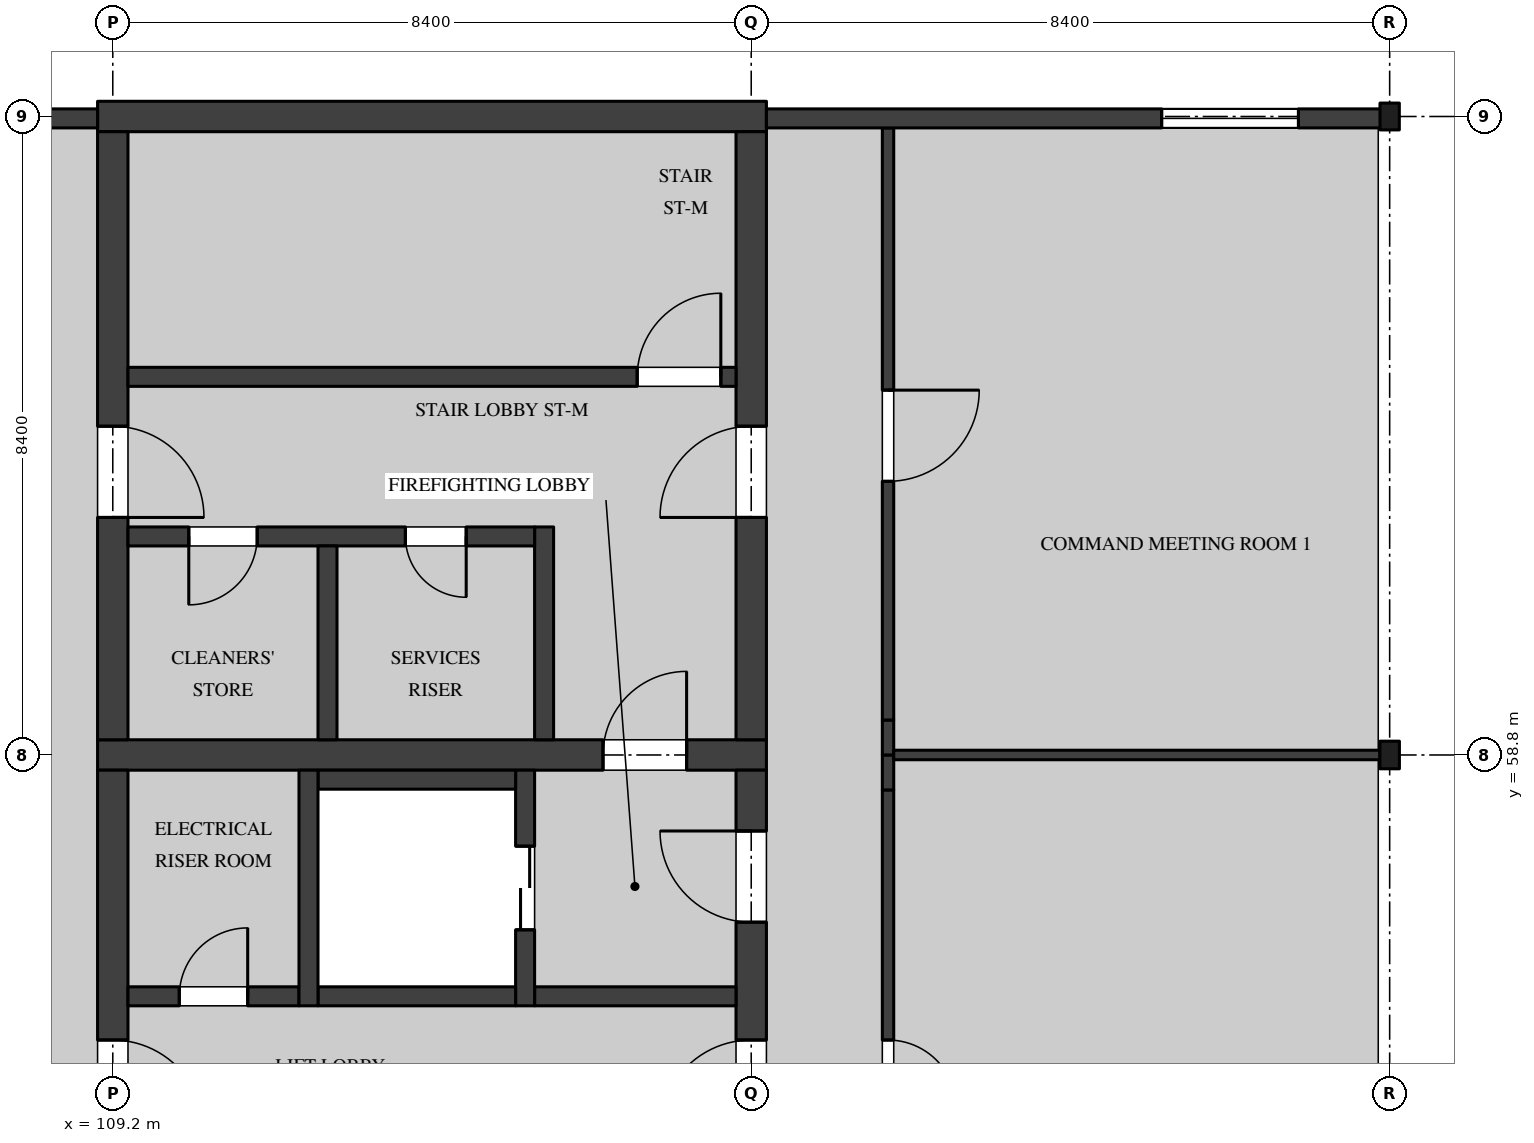
"""IFC4 building model, lengths in metres.
Left out: names, types, materials, properties, quantities, classifications, styles, units other than length and angle.
Written with IfcOpenShell. Run it as: python <this file> out.ifc"""

import sys

from ifc_helpers import new_model, si_unit, direction, frame, frame_2d, origin, origin_2d, place, context, subcontext, project, spatial, rectangle, i_section, extrude, element, fill, save


model = new_model("IFC4")
c1 = context("Model", 3, precision=1e-05, world=origin(), true_north=direction((0.0, 1.0)))
c2 = subcontext(c1, "Body", "Model", "MODEL_VIEW")
j1 = project(units=[si_unit("LENGTHUNIT", "METRE"), si_unit("PLANEANGLEUNIT", "RADIAN")], contexts=[c1])
p1 = place(None, origin())
s1 = spatial("IfcSite", under=j1, at=p1, CompositionType="ELEMENT")
p2 = place(p1, origin())
s2 = spatial("IfcBuilding", under=s1, at=p2, CompositionType="ELEMENT")
p3 = place(p2, frame((0.0, 0.0, 36.9)))
s3 = spatial("IfcBuildingStorey", under=s2, at=p3, CompositionType="ELEMENT", Elevation=36.9)
p4 = place(p3, frame((126.0, 58.8, 0.0), z_axis=(0.0, 0.0, 1.0), x_axis=(1.0, 0.0, 0.0)))
e1 = element("IfcColumn", 1, at=p4, inside=s3, PredefinedType="COLUMN", context=c2, shape_type="SweptSolid", body=[
    extrude(i_section(OverallWidth=0.257, OverallDepth=0.363, WebThickness=0.013, FlangeThickness=0.022, FilletRadius=0.015, at=origin_2d()), origin(), (0.0, 0.0, 1.0), 4.37),
])
p5 = place(p3, frame((126.0, 67.2, 0.0), z_axis=(0.0, 0.0, 1.0), x_axis=(1.0, 0.0, 0.0)))
e2 = element("IfcColumn", 2, at=p5, inside=s3, PredefinedType="COLUMN", context=c2, shape_type="SweptSolid", body=[
    extrude(i_section(OverallWidth=0.254, OverallDepth=0.353, WebThickness=0.01, FlangeThickness=0.016, FilletRadius=0.015, at=origin_2d()), origin(), (0.0, 0.0, 1.0), 4.37),
])
p6 = place(p3, frame((109.0, 58.8, 0.0), z_axis=(0.0, 0.0, 1.0), x_axis=(1.0, 0.0, 0.0)))
e3 = element("IfcWall", 3, at=p6, inside=s3, PredefinedType="SHEAR", context=c2, shape_type="SweptSolid", body=[
    extrude(rectangle(XDim=8.8, YDim=0.4, at=frame_2d((4.4, 0.0))), origin(), (0.0, 0.0, 1.0), 4.37),
])
p7 = place(p6, frame((6.65, 0.0, 0.0)))
e4 = element("IfcOpeningElement", 4, at=p7, cuts=e3, PredefinedType="OPENING", context=c2, shape_type="SweptSolid", body=[
    extrude(rectangle(XDim=1.1, YDim=2.1, at=frame_2d((0.55, 1.05))), frame((0.0, 0.21, 0.0), z_axis=(0.0, -1.0, 0.0), x_axis=(1.0, 0.0, 0.0)), (0.0, 0.0, 1.0), 0.42),
])
p8 = place(p3, frame((109.2, 50.6, 0.0), z_axis=(0.0, 0.0, 1.0), x_axis=(0.0, 1.0, 0.0)))
e5 = element("IfcWall", 5, at=p8, inside=s3, PredefinedType="SHEAR", context=c2, shape_type="SweptSolid", body=[
    extrude(rectangle(XDim=8.0, YDim=0.4, at=frame_2d((4.0, 0.0))), origin(), (0.0, 0.0, 1.0), 4.37),
])
p9 = place(p8, frame((3.25, 0.0, 0.0)))
e6 = element("IfcOpeningElement", 6, at=p9, cuts=e5, PredefinedType="OPENING", context=c2, shape_type="SweptSolid", body=[
    extrude(rectangle(XDim=1.2, YDim=2.1, at=frame_2d((0.6, 1.05))), frame((0.0, 0.21, 0.0), z_axis=(0.0, -1.0, 0.0), x_axis=(1.0, 0.0, 0.0)), (0.0, 0.0, 1.0), 0.42),
])
p10 = place(p3, frame((117.6, 50.6, 0.0), z_axis=(0.0, 0.0, 1.0), x_axis=(0.0, 1.0, 0.0)))
e7 = element("IfcWall", 7, at=p10, inside=s3, PredefinedType="SHEAR", context=c2, shape_type="SweptSolid", body=[
    extrude(rectangle(XDim=8.0, YDim=0.4, at=frame_2d((4.0, 0.0))), origin(), (0.0, 0.0, 1.0), 4.37),
])
p11 = place(p10, frame((3.25, 0.0, 0.0)))
e8 = element("IfcOpeningElement", 8, at=p11, cuts=e7, PredefinedType="OPENING", context=c2, shape_type="SweptSolid", body=[
    extrude(rectangle(XDim=1.2, YDim=2.1, at=frame_2d((0.6, 1.05))), frame((0.0, 0.21, 0.0), z_axis=(0.0, -1.0, 0.0), x_axis=(1.0, 0.0, 0.0)), (0.0, 0.0, 1.0), 0.42),
])
p12 = place(p10, frame((6.0, 0.0, 0.0)))
e9 = element("IfcOpeningElement", 9, at=p12, cuts=e7, PredefinedType="OPENING", context=c2, shape_type="SweptSolid", body=[
    extrude(rectangle(XDim=1.2, YDim=2.1, at=frame_2d((0.6, 1.05))), frame((0.0, 0.21, 0.0), z_axis=(0.0, -1.0, 0.0), x_axis=(1.0, 0.0, 0.0)), (0.0, 0.0, 1.0), 0.42),
])
p13 = place(p3, frame((109.4, 55.625, 0.0), z_axis=(0.0, 0.0, 1.0), x_axis=(1.0, 0.0, 0.0)))
e10 = element("IfcWall", 10, at=p13, inside=s3, PredefinedType="SOLIDWALL", context=c2, shape_type="SweptSolid", body=[
    extrude(rectangle(XDim=2.25, YDim=0.25, at=frame_2d((1.125, 0.0))), origin(), (0.0, 0.0, 1.0), 4.37),
])
p14 = place(p13, frame((0.675, 0.0, 0.0)))
e11 = element("IfcOpeningElement", 11, at=p14, cuts=e10, PredefinedType="OPENING", context=c2, shape_type="SweptSolid", body=[
    extrude(rectangle(XDim=0.9, YDim=2.1, at=frame_2d((0.45, 1.05))), frame((0.0, 0.135, 0.0), z_axis=(0.0, -1.0, 0.0), x_axis=(1.0, 0.0, 0.0)), (0.0, 0.0, 1.0), 0.27),
])
p15 = place(p3, frame((114.75, 55.625, 0.0), z_axis=(0.0, 0.0, 1.0), x_axis=(1.0, 0.0, 0.0)))
e12 = element("IfcWall", 12, at=p15, inside=s3, PredefinedType="SOLIDWALL", context=c2, shape_type="SweptSolid", body=[
    extrude(rectangle(XDim=2.65, YDim=0.25, at=frame_2d((1.325, 0.0))), origin(), (0.0, 0.0, 1.0), 4.37),
])
p16 = place(p3, frame((109.0, 67.2, 0.0), z_axis=(0.0, 0.0, 1.0), x_axis=(1.0, 0.0, 0.0)))
e13 = element("IfcWall", 13, at=p16, inside=s3, PredefinedType="SHEAR", context=c2, shape_type="SweptSolid", body=[
    extrude(rectangle(XDim=8.8, YDim=0.4, at=frame_2d((4.4, 0.0))), origin(), (0.0, 0.0, 1.0), 4.37),
])
p17 = place(p3, frame((109.2, 59.0, 0.0), z_axis=(0.0, 0.0, 1.0), x_axis=(0.0, 1.0, 0.0)))
e14 = element("IfcWall", 14, at=p17, inside=s3, PredefinedType="SHEAR", context=c2, shape_type="SweptSolid", body=[
    extrude(rectangle(XDim=8.0, YDim=0.4, at=frame_2d((4.0, 0.0))), origin(), (0.0, 0.0, 1.0), 4.37),
])
p18 = place(p17, frame((2.925, 0.0, 0.0)))
e15 = element("IfcOpeningElement", 15, at=p18, cuts=e14, PredefinedType="OPENING", context=c2, shape_type="SweptSolid", body=[
    extrude(rectangle(XDim=1.2, YDim=2.1, at=frame_2d((0.6, 1.05))), frame((0.0, 0.21, 0.0), z_axis=(0.0, -1.0, 0.0), x_axis=(1.0, 0.0, 0.0)), (0.0, 0.0, 1.0), 0.42),
])
p19 = place(p3, frame((117.6, 59.0, 0.0), z_axis=(0.0, 0.0, 1.0), x_axis=(0.0, 1.0, 0.0)))
e16 = element("IfcWall", 16, at=p19, inside=s3, PredefinedType="SHEAR", context=c2, shape_type="SweptSolid", body=[
    extrude(rectangle(XDim=8.0, YDim=0.4, at=frame_2d((4.0, 0.0))), origin(), (0.0, 0.0, 1.0), 4.37),
])
p20 = place(p19, frame((2.925, 0.0, 0.0)))
e17 = element("IfcOpeningElement", 17, at=p20, cuts=e16, PredefinedType="OPENING", context=c2, shape_type="SweptSolid", body=[
    extrude(rectangle(XDim=1.2, YDim=2.1, at=frame_2d((0.6, 1.05))), frame((0.0, 0.21, 0.0), z_axis=(0.0, -1.0, 0.0), x_axis=(1.0, 0.0, 0.0)), (0.0, 0.0, 1.0), 0.42),
])
p21 = place(p3, frame((117.4, 63.775, 0.0), z_axis=(0.0, 0.0, 1.0), x_axis=(-1.0, 0.0, 0.0)))
e18 = element("IfcWall", 18, at=p21, inside=s3, PredefinedType="SOLIDWALL", context=c2, shape_type="SweptSolid", body=[
    extrude(rectangle(XDim=8.0, YDim=0.25, at=frame_2d((4.0, 0.0))), origin(), (0.0, 0.0, 1.0), 4.37),
])
p22 = place(p21, frame((0.2, 0.0, 0.0)))
e19 = element("IfcOpeningElement", 19, at=p22, cuts=e18, PredefinedType="OPENING", context=c2, shape_type="SweptSolid", body=[
    extrude(rectangle(XDim=1.1, YDim=2.1, at=frame_2d((0.55, 1.05))), frame((0.0, 0.135, 0.0), z_axis=(0.0, -1.0, 0.0), x_axis=(1.0, 0.0, 0.0)), (0.0, 0.0, 1.0), 0.27),
])
p23 = place(p3, frame((114.875, 61.8, 0.0), z_axis=(0.0, 0.0, 1.0), x_axis=(0.0, -1.0, 0.0)))
e20 = element("IfcWall", 20, at=p23, inside=s3, PredefinedType="SOLIDWALL", context=c2, shape_type="SweptSolid", body=[
    extrude(rectangle(XDim=2.8, YDim=0.25, at=frame_2d((1.4, 0.0))), origin(), (0.0, 0.0, 1.0), 4.37),
])
p24 = place(p3, frame((114.75, 61.675, 0.0), z_axis=(0.0, 0.0, 1.0), x_axis=(-1.0, 0.0, 0.0)))
e21 = element("IfcWall", 21, at=p24, inside=s3, PredefinedType="SOLIDWALL", context=c2, shape_type="SweptSolid", body=[
    extrude(rectangle(XDim=5.35, YDim=0.25, at=frame_2d((2.675, 0.0))), origin(), (0.0, 0.0, 1.0), 4.37),
])
p25 = place(p24, frame((3.65, 0.0, 0.0)))
e22 = element("IfcOpeningElement", 22, at=p25, cuts=e21, PredefinedType="OPENING", context=c2, shape_type="SweptSolid", body=[
    extrude(rectangle(XDim=0.9, YDim=2.1, at=frame_2d((0.45, 1.05))), frame((0.0, 0.135, 0.0), z_axis=(0.0, -1.0, 0.0), x_axis=(1.0, 0.0, 0.0)), (0.0, 0.0, 1.0), 0.27),
])
p26 = place(p24, frame((0.9, 0.0, 0.0)))
e23 = element("IfcOpeningElement", 23, at=p26, cuts=e21, PredefinedType="OPENING", context=c2, shape_type="SweptSolid", body=[
    extrude(rectangle(XDim=0.8, YDim=2.1, at=frame_2d((0.4, 1.05))), frame((0.0, 0.135, 0.0), z_axis=(0.0, -1.0, 0.0), x_axis=(1.0, 0.0, 0.0)), (0.0, 0.0, 1.0), 0.27),
])
p27 = place(p3, frame((112.025, 61.55, 0.0), z_axis=(0.0, 0.0, 1.0), x_axis=(0.0, -1.0, 0.0)))
e24 = element("IfcWall", 24, at=p27, inside=s3, PredefinedType="SOLIDWALL", context=c2, shape_type="SweptSolid", body=[
    extrude(rectangle(XDim=2.55, YDim=0.25, at=frame_2d((1.275, 0.0))), origin(), (0.0, 0.0, 1.0), 4.37),
])
p28 = place(p3, frame((114.625, 55.5, 0.0), z_axis=(0.0, 0.0, 1.0), x_axis=(0.0, 1.0, 0.0)))
e25 = element("IfcWall", 25, at=p28, inside=s3, PredefinedType="SOLIDWALL", context=c2, shape_type="SweptSolid", body=[
    extrude(rectangle(XDim=3.1, YDim=0.25, at=frame_2d((1.55, 0.0))), origin(), (0.0, 0.0, 1.0), 4.37),
])
p29 = place(p28, frame((1.0, 0.0, 0.0)))
e26 = element("IfcOpeningElement", 26, at=p29, cuts=e25, PredefinedType="OPENING", context=c2, shape_type="SweptSolid", body=[
    extrude(rectangle(XDim=1.1, YDim=2.1, at=frame_2d((0.55, 1.05))), frame((0.0, 0.135, 0.0), z_axis=(0.0, -1.0, 0.0), x_axis=(1.0, 0.0, 0.0)), (0.0, 0.0, 1.0), 0.27),
])
for number, where, z_axis, x_axis in (
    (27, (111.9, 58.475, 0.0), (0.0, 0.0, 1.0), (1.0, 0.0, 0.0)),
    (28, (111.9, 55.625, 0.0), (0.0, 0.0, 1.0), (1.0, 0.0, 0.0)),
):
    element("IfcWall", number, at=place(p3, frame(where, z_axis=z_axis, x_axis=x_axis)), inside=s3, PredefinedType="SOLIDWALL", context=c2, shape_type="SweptSolid", body=[
        extrude(rectangle(XDim=2.6, YDim=0.25, at=frame_2d((1.3, 0.0))), origin(), (0.0, 0.0, 1.0), 4.37),
    ])
p30 = place(p3, frame((111.775, 55.5, 0.0), z_axis=(0.0, 0.0, 1.0), x_axis=(0.0, 1.0, 0.0)))
e29 = element("IfcWall", 29, at=p30, inside=s3, PredefinedType="SOLIDWALL", context=c2, shape_type="SweptSolid", body=[
    extrude(rectangle(XDim=3.1, YDim=0.25, at=frame_2d((1.55, 0.0))), origin(), (0.0, 0.0, 1.0), 4.37),
])
p31 = place(p3, frame((119.4, 50.86, 0.0), z_axis=(0.0, 0.0, 1.0), x_axis=(0.0, 1.0, 0.0)))
e30 = element("IfcWall", 30, at=p31, inside=s3, PredefinedType="PARTITIONING", context=c2, shape_type="SweptSolid", body=[
    extrude(rectangle(XDim=7.48, YDim=0.15, at=frame_2d((3.74, 0.0))), origin(), (0.0, 0.0, 1.0), 4.37),
])
p32 = place(p31, frame((3.29, 0.0, 0.0)))
e31 = element("IfcOpeningElement", 31, at=p32, cuts=e30, PredefinedType="OPENING", context=c2, shape_type="SweptSolid", body=[
    extrude(rectangle(XDim=0.9, YDim=2.1, at=frame_2d((0.45, 1.05))), frame((0.0, 0.085, 0.0), z_axis=(0.0, -1.0, 0.0), x_axis=(1.0, 0.0, 0.0)), (0.0, 0.0, 1.0), 0.17),
])
for number, where, z_axis, x_axis in (
    (32, (119.4, 58.34, 0.0), (0.0, 0.0, 1.0), (0.0, 1.0, 0.0)),
    (33, (119.4, 58.8, 0.0), (0.0, 0.0, 1.0), (0.0, 1.0, 0.0)),
):
    element("IfcWall", number, at=place(p3, frame(where, z_axis=z_axis, x_axis=x_axis)), inside=s3, PredefinedType="PARTITIONING", context=c2, shape_type="SweptSolid", body=[
        extrude(rectangle(XDim=0.46, YDim=0.15, at=frame_2d((0.23, 0.0))), origin(), (0.0, 0.0, 1.0), 3.817),
    ])
p33 = place(p3, frame((119.4, 59.26, 0.0), z_axis=(0.0, 0.0, 1.0), x_axis=(0.0, 1.0, 0.0)))
e34 = element("IfcWall", 34, at=p33, inside=s3, PredefinedType="PARTITIONING", context=c2, shape_type="SweptSolid", body=[
    extrude(rectangle(XDim=7.79, YDim=0.15, at=frame_2d((3.895, 0.0))), origin(), (0.0, 0.0, 1.0), 4.37),
])
p34 = place(p33, frame((3.14, 0.0, 0.0)))
e35 = element("IfcOpeningElement", 35, at=p34, cuts=e34, PredefinedType="OPENING", context=c2, shape_type="SweptSolid", body=[
    extrude(rectangle(XDim=1.2, YDim=2.4, at=frame_2d((0.6, 1.2))), frame((0.0, 0.085, 0.0), z_axis=(0.0, -1.0, 0.0), x_axis=(1.0, 0.0, 0.0)), (0.0, 0.0, 1.0), 0.17),
])
p35 = place(p3, frame((119.475, 58.8, 0.0), z_axis=(0.0, 0.0, 1.0), x_axis=(1.0, 0.0, 0.0)))
e36 = element("IfcWall", 36, at=p35, inside=s3, PredefinedType="PARTITIONING", context=c2, shape_type="SweptSolid", body=[
    extrude(rectangle(XDim=6.396, YDim=0.125, at=frame_2d((3.198, 0.0))), origin(), (0.0, 0.0, 1.0), 3.817),
])
p36 = place(p3, frame((125.995, 67.175, 0.0), z_axis=(0.0, 0.0, 1.0), x_axis=(-1.0, 0.0, 0.0)))
e37 = element("IfcWall", 37, at=p36, inside=s3, PredefinedType="SOLIDWALL", context=c2, shape_type="SweptSolid", body=[
    extrude(rectangle(XDim=8.195, YDim=0.25, at=frame_2d((4.097, 0.0))), origin(), (0.0, 0.0, 1.0), 3.819),
])
p37 = place(p36, frame((1.195, 0.0, 0.6)))
e38 = element("IfcOpeningElement", 38, at=p37, cuts=e37, PredefinedType="OPENING", context=c2, shape_type="SweptSolid", body=[
    extrude(rectangle(XDim=1.8, YDim=2.7, at=frame_2d((0.9, 1.35))), frame((0.0, 0.135, 0.0), z_axis=(0.0, -1.0, 0.0), x_axis=(1.0, 0.0, 0.0)), (0.0, 0.0, 1.0), 0.27),
])
p38 = place(p3, frame((109.0, 67.175, 0.0), z_axis=(0.0, 0.0, 1.0), x_axis=(-1.0, 0.0, 0.0)))
e39 = element("IfcWall", 39, at=p38, inside=s3, PredefinedType="SOLIDWALL", context=c2, shape_type="SweptSolid", body=[
    extrude(rectangle(XDim=8.195, YDim=0.25, at=frame_2d((4.097, 0.0))), origin(), (0.0, 0.0, 1.0), 3.819),
])
p39 = place(p38, frame((5.65, 0.0, 1.5)))
e40 = element("IfcOpeningElement", 40, at=p39, cuts=e39, PredefinedType="OPENING", context=c2, shape_type="SweptSolid", body=[
    extrude(rectangle(XDim=0.9, YDim=1.2, at=frame_2d((0.45, 0.6))), frame((0.0, 0.135, 0.0), z_axis=(0.0, -1.0, 0.0), x_axis=(1.0, 0.0, 0.0)), (0.0, 0.0, 1.0), 0.27),
])
p40 = place(p9, frame((1.2, 0.0, 0.0), z_axis=(0.0, 0.0, 1.0), x_axis=(-1.0, 0.0, 0.0)))
e41 = element("IfcDoor", 41, at=p40, inside=s3, OperationType="SINGLE_SWING_LEFT", PredefinedType="DOOR", context=c2, shape_type="SweptSolid", body=[
    extrude(rectangle(XDim=1.2, YDim=2.1, at=frame_2d((0.6, 1.05))), frame((0.0, 0.035, 0.0), z_axis=(0.0, -1.0, 0.0), x_axis=(1.0, 0.0, 0.0)), (0.0, 0.0, 1.0), 0.07),
])
fill(e6, e41)
p41 = place(p11, origin())
e42 = element("IfcDoor", 42, at=p41, inside=s3, OperationType="SINGLE_SWING_RIGHT", PredefinedType="DOOR", context=c2, shape_type="SweptSolid", body=[
    extrude(rectangle(XDim=1.2, YDim=2.1, at=frame_2d((0.6, 1.05))), frame((0.0, 0.035, 0.0), z_axis=(0.0, -1.0, 0.0), x_axis=(1.0, 0.0, 0.0)), (0.0, 0.0, 1.0), 0.07),
])
fill(e8, e42)
p42 = place(p12, origin())
e43 = element("IfcDoor", 43, at=p42, inside=s3, OperationType="SINGLE_SWING_LEFT", PredefinedType="DOOR", context=c2, shape_type="SweptSolid", body=[
    extrude(rectangle(XDim=1.2, YDim=2.1, at=frame_2d((0.6, 1.05))), frame((0.0, 0.035, 0.0), z_axis=(0.0, -1.0, 0.0), x_axis=(1.0, 0.0, 0.0)), (0.0, 0.0, 1.0), 0.07),
])
fill(e9, e43)
p43 = place(p7, origin())
e44 = element("IfcDoor", 44, at=p43, inside=s3, OperationType="SINGLE_SWING_LEFT", PredefinedType="DOOR", context=c2, shape_type="SweptSolid", body=[
    extrude(rectangle(XDim=1.1, YDim=2.1, at=frame_2d((0.55, 1.05))), frame((0.0, 0.035, 0.0), z_axis=(0.0, -1.0, 0.0), x_axis=(1.0, 0.0, 0.0)), (0.0, 0.0, 1.0), 0.07),
])
fill(e4, e44)
p44 = place(p14, origin())
e45 = element("IfcDoor", 45, at=p44, inside=s3, OperationType="SINGLE_SWING_LEFT", PredefinedType="DOOR", context=c2, shape_type="SweptSolid", body=[
    extrude(rectangle(XDim=0.9, YDim=2.1, at=frame_2d((0.45, 1.05))), frame((0.0, 0.05, 0.0), z_axis=(0.0, -1.0, 0.0), x_axis=(1.0, 0.0, 0.0)), (0.0, 0.0, 1.0), 0.1),
])
fill(e11, e45)
p45 = place(p25, origin())
e46 = element("IfcDoor", 46, at=p45, inside=s3, OperationType="SINGLE_SWING_LEFT", PredefinedType="DOOR", context=c2, shape_type="SweptSolid", body=[
    extrude(rectangle(XDim=0.9, YDim=2.1, at=frame_2d((0.45, 1.05))), frame((0.0, 0.035, 0.0), z_axis=(0.0, -1.0, 0.0), x_axis=(1.0, 0.0, 0.0)), (0.0, 0.0, 1.0), 0.07),
])
fill(e22, e46)
p46 = place(p18, frame((1.2, 0.0, 0.0), z_axis=(0.0, 0.0, 1.0), x_axis=(-1.0, 0.0, 0.0)))
e47 = element("IfcDoor", 47, at=p46, inside=s3, OperationType="SINGLE_SWING_LEFT", PredefinedType="DOOR", context=c2, shape_type="SweptSolid", body=[
    extrude(rectangle(XDim=1.2, YDim=2.1, at=frame_2d((0.6, 1.05))), frame((0.0, 0.035, 0.0), z_axis=(0.0, -1.0, 0.0), x_axis=(1.0, 0.0, 0.0)), (0.0, 0.0, 1.0), 0.07),
])
fill(e15, e47)
p47 = place(p20, origin())
e48 = element("IfcDoor", 48, at=p47, inside=s3, OperationType="SINGLE_SWING_RIGHT", PredefinedType="DOOR", context=c2, shape_type="SweptSolid", body=[
    extrude(rectangle(XDim=1.2, YDim=2.1, at=frame_2d((0.6, 1.05))), frame((0.0, 0.035, 0.0), z_axis=(0.0, -1.0, 0.0), x_axis=(1.0, 0.0, 0.0)), (0.0, 0.0, 1.0), 0.07),
])
fill(e17, e48)
p48 = place(p26, origin())
e49 = element("IfcDoor", 49, at=p48, inside=s3, OperationType="SINGLE_SWING_RIGHT", PredefinedType="DOOR", context=c2, shape_type="SweptSolid", body=[
    extrude(rectangle(XDim=0.8, YDim=2.1, at=frame_2d((0.4, 1.05))), frame((0.0, 0.035, 0.0), z_axis=(0.0, -1.0, 0.0), x_axis=(1.0, 0.0, 0.0)), (0.0, 0.0, 1.0), 0.07),
])
fill(e23, e49)
p49 = place(p22, frame((1.1, 0.0, 0.0), z_axis=(0.0, 0.0, 1.0), x_axis=(-1.0, 0.0, 0.0)))
e50 = element("IfcDoor", 50, at=p49, inside=s3, OperationType="SINGLE_SWING_LEFT", PredefinedType="DOOR", context=c2, shape_type="SweptSolid", body=[
    extrude(rectangle(XDim=1.1, YDim=2.1, at=frame_2d((0.55, 1.05))), frame((0.0, 0.035, 0.0), z_axis=(0.0, -1.0, 0.0), x_axis=(1.0, 0.0, 0.0)), (0.0, 0.0, 1.0), 0.07),
])
fill(e19, e50)
p50 = place(p29, origin())
e51 = element("IfcDoor", 51, at=p50, inside=s3, OperationType="DOUBLE_DOOR_SLIDING", PredefinedType="DOOR", context=c2, shape_type="SweptSolid", body=[
    extrude(rectangle(XDim=1.1, YDim=2.1, at=frame_2d((0.55, 1.05))), frame((0.0, 0.04, 0.0), z_axis=(0.0, -1.0, 0.0), x_axis=(1.0, 0.0, 0.0)), (0.0, 0.0, 1.0), 0.08),
])
fill(e26, e51)
p51 = place(p32, frame((0.9, 0.0, 0.0), z_axis=(0.0, 0.0, 1.0), x_axis=(-1.0, 0.0, 0.0)))
e52 = element("IfcDoor", 52, at=p51, inside=s3, OperationType="SINGLE_SWING_LEFT", PredefinedType="DOOR", context=c2, shape_type="SweptSolid", body=[
    extrude(rectangle(XDim=0.9, YDim=2.1, at=frame_2d((0.45, 1.05))), frame((0.0, 0.025, 0.0), z_axis=(0.0, -1.0, 0.0), x_axis=(1.0, 0.0, 0.0)), (0.0, 0.0, 1.0), 0.05),
])
fill(e31, e52)
p52 = place(p34, frame((1.2, 0.0, 0.0), z_axis=(0.0, 0.0, 1.0), x_axis=(-1.0, 0.0, 0.0)))
e53 = element("IfcDoor", 53, at=p52, inside=s3, OperationType="SINGLE_SWING_RIGHT", PredefinedType="DOOR", context=c2, shape_type="SweptSolid", body=[
    extrude(rectangle(XDim=1.2, YDim=2.4, at=frame_2d((0.6, 1.2))), frame((0.0, 0.025, 0.0), z_axis=(0.0, -1.0, 0.0), x_axis=(1.0, 0.0, 0.0)), (0.0, 0.0, 1.0), 0.05),
])
fill(e35, e53)
p53 = place(p37, origin())
e54 = element("IfcWindow", 54, at=p53, inside=s3, PartitioningType="SINGLE_PANEL", PredefinedType="WINDOW", context=c2, shape_type="SweptSolid", body=[
    extrude(rectangle(XDim=1.8, YDim=2.7, at=frame_2d((0.9, 1.35))), frame((0.0, 0.03, 0.0), z_axis=(0.0, -1.0, 0.0), x_axis=(1.0, 0.0, 0.0)), (0.0, 0.0, 1.0), 0.06),
])
fill(e38, e54)
save(model, sys.argv[1])
